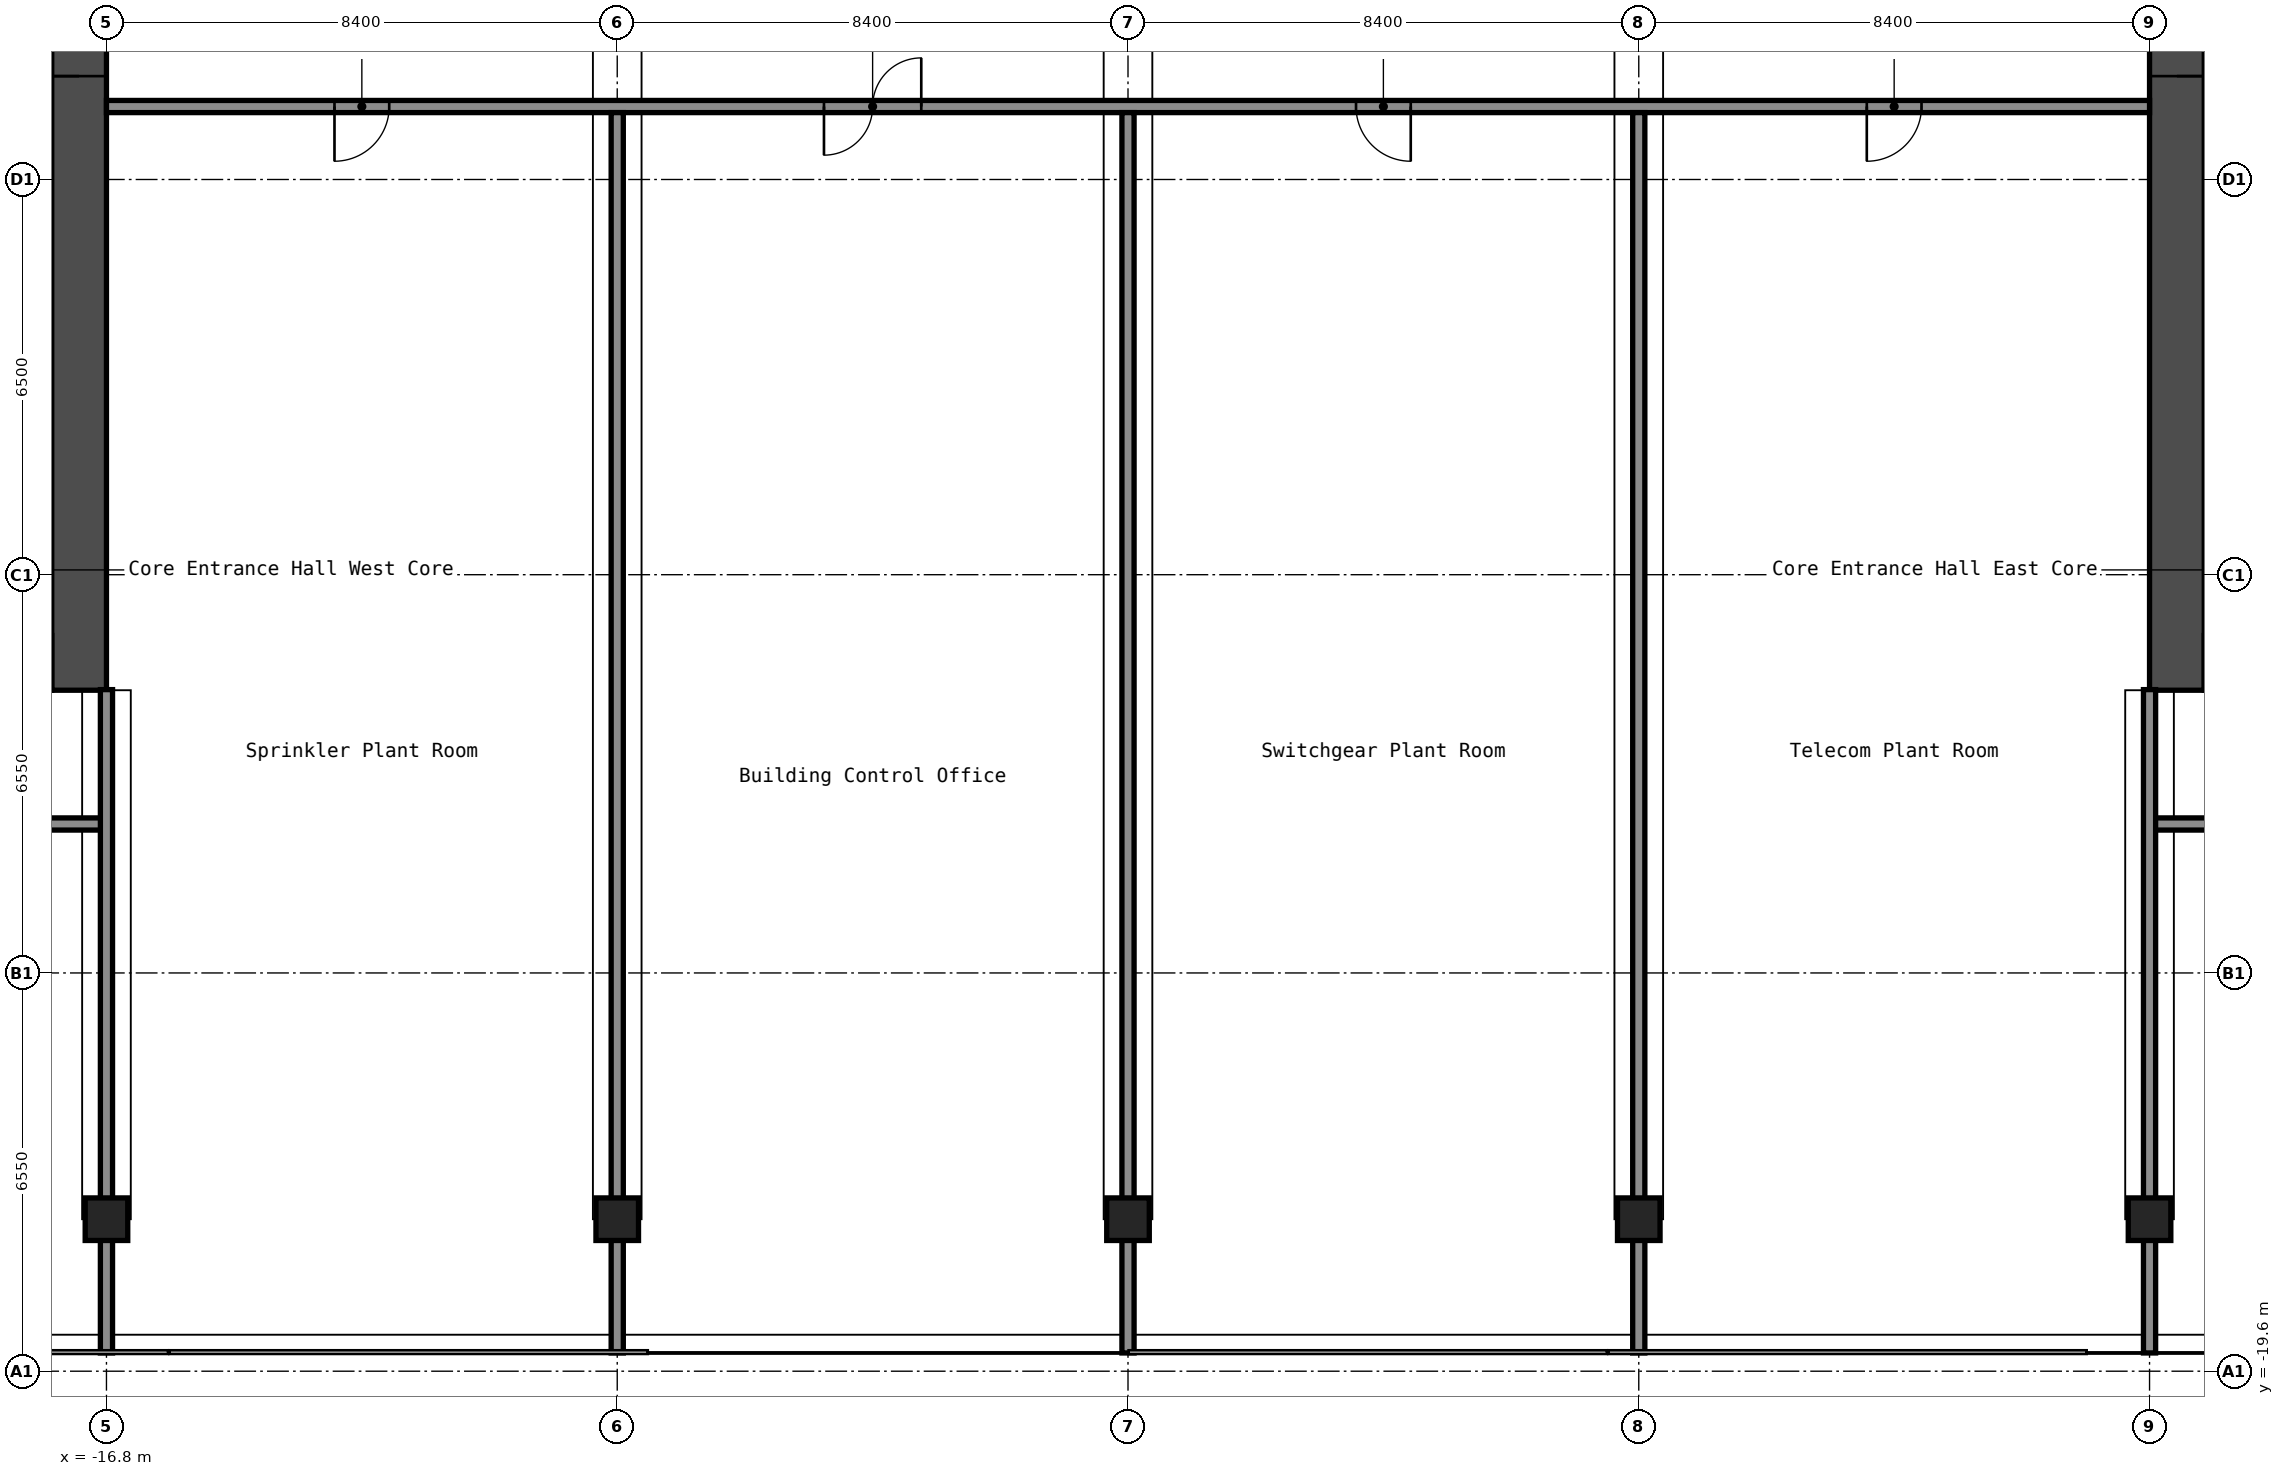
"""IFC4 building model, lengths in metres.
Left out: names, types, materials, properties, quantities, classifications, styles, units other than length and angle.
Written with IfcOpenShell. Run it as: python <this file> out.ifc"""

import sys

from ifc_helpers import new_model, si_unit, direction, frame, frame_2d, origin, origin_2d, place, context, subcontext, project, spatial, rectangle, hollow_rectangle, extrude, element, fill, save


model = new_model("IFC4")
c1 = context("Model", 3, precision=1e-05, world=origin(), true_north=direction((0.0, 1.0)))
c2 = subcontext(c1, "Body", "Model", "MODEL_VIEW")
j1 = project(units=[si_unit("LENGTHUNIT", "METRE"), si_unit("PLANEANGLEUNIT", "RADIAN")], contexts=[c1])
p1 = place(None, origin())
s1 = spatial("IfcSite", under=j1, at=p1, CompositionType="ELEMENT")
p2 = place(p1, origin())
s2 = spatial("IfcBuilding", under=s1, at=p2, CompositionType="ELEMENT")
p3 = place(p2, frame((0.0, 0.0, 175.8)))
s3 = spatial("IfcBuildingStorey", under=s2, at=p3, CompositionType="ELEMENT", Elevation=175.8)
for number, where, z_axis, x_axis in (
    (1, (-16.8, -17.1, 0.0), (0.0, 0.0, 1.0), (1.0, 0.0, 0.0)),
    (2, (-8.4, -17.1, 0.0), (0.0, 0.0, 1.0), (1.0, 0.0, 0.0)),
    (3, (0.0, -17.1, 0.0), (0.0, 0.0, 1.0), (1.0, 0.0, 0.0)),
    (4, (8.4, -17.1, 0.0), (0.0, 0.0, 1.0), (1.0, 0.0, 0.0)),
    (5, (16.8, -17.1, 0.0), (0.0, 0.0, 1.0), (1.0, 0.0, 0.0)),
):
    element("IfcColumn", number, at=place(p3, frame(where, z_axis=z_axis, x_axis=x_axis)), inside=s3, PredefinedType="COLUMN", context=c2, shape_type="SweptSolid", body=[
        extrude(hollow_rectangle(XDim=0.7, YDim=0.7, WallThickness=0.028, at=origin_2d()), origin(), (0.0, 0.0, 1.0), 4.1),
    ])
p4 = place(p3, frame((-17.25, -8.4, 0.0), z_axis=(0.0, 0.0, 1.0), x_axis=(0.0, 1.0, 0.0)))
e6 = element("IfcWall", 6, at=p4, inside=s3, PredefinedType="SHEAR", context=c2, shape_type="SweptSolid", body=[
    extrude(rectangle(XDim=16.8, YDim=0.9, at=frame_2d((8.4, 0.0))), origin(), (0.0, 0.0, 1.0), 4.1),
])
p5 = place(p4, frame((10.1, 0.0, 0.0)))
e7 = element("IfcOpeningElement", 7, at=p5, cuts=e6, PredefinedType="OPENING", context=c2, shape_type="SweptSolid", body=[
    extrude(rectangle(XDim=1.6, YDim=2.1, at=frame_2d((0.8, 1.05))), frame((0.0, 0.46, 0.0), z_axis=(0.0, -1.0, 0.0), x_axis=(1.0, 0.0, 0.0)), (0.0, 0.0, 1.0), 0.92),
])
p6 = place(p3, frame((-32.7, -7.95, 0.0), z_axis=(0.0, 0.0, 1.0), x_axis=(1.0, 0.0, 0.0)))
e8 = element("IfcWall", 8, at=p6, inside=s3, PredefinedType="SHEAR", context=c2, shape_type="SweptSolid", body=[
    extrude(rectangle(XDim=15.0, YDim=0.9, at=frame_2d((7.5, 0.0))), origin(), (0.0, 0.0, 1.0), 4.1),
])
p7 = place(p6, frame((11.45, 0.0, 0.0)))
e9 = element("IfcOpeningElement", 9, at=p7, cuts=e8, PredefinedType="OPENING", context=c2, shape_type="SweptSolid", body=[
    extrude(rectangle(XDim=1.0, YDim=2.1, at=frame_2d((0.5, 1.05))), frame((0.0, 0.46, 0.0), z_axis=(0.0, -1.0, 0.0), x_axis=(1.0, 0.0, 0.0)), (0.0, 0.0, 1.0), 0.92),
])
p8 = place(p3, frame((17.25, -8.4, 0.0), z_axis=(0.0, 0.0, 1.0), x_axis=(0.0, 1.0, 0.0)))
e10 = element("IfcWall", 10, at=p8, inside=s3, PredefinedType="SHEAR", context=c2, shape_type="SweptSolid", body=[
    extrude(rectangle(XDim=16.8, YDim=0.9, at=frame_2d((8.4, 0.0))), origin(), (0.0, 0.0, 1.0), 4.1),
])
p9 = place(p8, frame((10.1, 0.0, 0.0)))
e11 = element("IfcOpeningElement", 11, at=p9, cuts=e10, PredefinedType="OPENING", context=c2, shape_type="SweptSolid", body=[
    extrude(rectangle(XDim=1.6, YDim=2.1, at=frame_2d((0.8, 1.05))), frame((0.0, 0.46, 0.0), z_axis=(0.0, -1.0, 0.0), x_axis=(1.0, 0.0, 0.0)), (0.0, 0.0, 1.0), 0.92),
])
p10 = place(p3, frame((17.7, -7.95, 0.0), z_axis=(0.0, 0.0, 1.0), x_axis=(1.0, 0.0, 0.0)))
e12 = element("IfcWall", 12, at=p10, inside=s3, PredefinedType="SHEAR", context=c2, shape_type="SweptSolid", body=[
    extrude(rectangle(XDim=15.0, YDim=0.9, at=frame_2d((7.5, 0.0))), origin(), (0.0, 0.0, 1.0), 4.1),
])
p11 = place(p10, frame((2.55, 0.0, 0.0)))
e13 = element("IfcOpeningElement", 13, at=p11, cuts=e12, PredefinedType="OPENING", context=c2, shape_type="SweptSolid", body=[
    extrude(rectangle(XDim=1.0, YDim=2.1, at=frame_2d((0.5, 1.05))), frame((0.0, 0.46, 0.0), z_axis=(0.0, -1.0, 0.0), x_axis=(1.0, 0.0, 0.0)), (0.0, 0.0, 1.0), 0.92),
])
p12 = place(p3, frame((-42.7, -10.6, 0.0), z_axis=(0.0, 0.0, 1.0), x_axis=(1.0, 0.0, 0.0)))
e14 = element("IfcWall", 14, at=p12, inside=s3, PredefinedType="PARTITIONING", context=c2, shape_type="SweptSolid", body=[
    extrude(rectangle(XDim=25.9, YDim=0.2, at=frame_2d((12.95, 0.0))), origin(), (0.0, 0.0, 1.0), 4.1),
])
p13 = place(p12, frame((4.25, 0.0, 0.0)))
e15 = element("IfcOpeningElement", 15, at=p13, cuts=e14, PredefinedType="OPENING", context=c2, shape_type="SweptSolid", body=[
    extrude(rectangle(XDim=0.9, YDim=2.1, at=frame_2d((0.45, 1.05))), frame((0.0, 0.11, 0.0), z_axis=(0.0, -1.0, 0.0), x_axis=(1.0, 0.0, 0.0)), (0.0, 0.0, 1.0), 0.22),
])
p14 = place(p12, frame((12.5, 0.0, 0.0)))
e16 = element("IfcOpeningElement", 16, at=p14, cuts=e14, PredefinedType="OPENING", context=c2, shape_type="SweptSolid", body=[
    extrude(rectangle(XDim=1.6, YDim=2.1, at=frame_2d((0.8, 1.05))), frame((0.0, 0.11, 0.0), z_axis=(0.0, -1.0, 0.0), x_axis=(1.0, 0.0, 0.0)), (0.0, 0.0, 1.0), 0.22),
])
p15 = place(p12, frame((21.25, 0.0, 0.0)))
e17 = element("IfcOpeningElement", 17, at=p15, cuts=e14, PredefinedType="OPENING", context=c2, shape_type="SweptSolid", body=[
    extrude(rectangle(XDim=0.9, YDim=2.1, at=frame_2d((0.45, 1.05))), frame((0.0, 0.11, 0.0), z_axis=(0.0, -1.0, 0.0), x_axis=(1.0, 0.0, 0.0)), (0.0, 0.0, 1.0), 0.22),
])
p16 = place(p3, frame((16.8, -10.6, 0.0), z_axis=(0.0, 0.0, 1.0), x_axis=(1.0, 0.0, 0.0)))
e18 = element("IfcWall", 18, at=p16, inside=s3, PredefinedType="PARTITIONING", context=c2, shape_type="SweptSolid", body=[
    extrude(rectangle(XDim=25.9, YDim=0.2, at=frame_2d((12.95, 0.0))), origin(), (0.0, 0.0, 1.0), 4.1),
])
p17 = place(p16, frame((3.75, 0.0, 0.0)))
e19 = element("IfcOpeningElement", 19, at=p17, cuts=e18, PredefinedType="OPENING", context=c2, shape_type="SweptSolid", body=[
    extrude(rectangle(XDim=0.9, YDim=2.1, at=frame_2d((0.45, 1.05))), frame((0.0, 0.11, 0.0), z_axis=(0.0, -1.0, 0.0), x_axis=(1.0, 0.0, 0.0)), (0.0, 0.0, 1.0), 0.22),
])
p18 = place(p16, frame((11.8, 0.0, 0.0)))
e20 = element("IfcOpeningElement", 20, at=p18, cuts=e18, PredefinedType="OPENING", context=c2, shape_type="SweptSolid", body=[
    extrude(rectangle(XDim=1.6, YDim=2.1, at=frame_2d((0.8, 1.05))), frame((0.0, 0.11, 0.0), z_axis=(0.0, -1.0, 0.0), x_axis=(1.0, 0.0, 0.0)), (0.0, 0.0, 1.0), 0.22),
])
p19 = place(p16, frame((20.75, 0.0, 0.0)))
e21 = element("IfcOpeningElement", 21, at=p19, cuts=e18, PredefinedType="OPENING", context=c2, shape_type="SweptSolid", body=[
    extrude(rectangle(XDim=0.9, YDim=2.1, at=frame_2d((0.45, 1.05))), frame((0.0, 0.11, 0.0), z_axis=(0.0, -1.0, 0.0), x_axis=(1.0, 0.0, 0.0)), (0.0, 0.0, 1.0), 0.22),
])
p20 = place(p3, frame((-16.8, 1.2, 0.0), z_axis=(0.0, 0.0, 1.0), x_axis=(1.0, 0.0, 0.0)))
e22 = element("IfcWall", 22, at=p20, inside=s3, PredefinedType="PARTITIONING", context=c2, shape_type="SweptSolid", body=[
    extrude(rectangle(XDim=33.6, YDim=0.2, at=frame_2d((16.8, 0.0))), origin(), (0.0, 0.0, 1.0), 4.1),
])
p21 = place(p20, frame((3.75, 0.0, 0.0)))
e23 = element("IfcOpeningElement", 23, at=p21, cuts=e22, PredefinedType="OPENING", context=c2, shape_type="SweptSolid", body=[
    extrude(rectangle(XDim=0.9, YDim=2.1, at=frame_2d((0.45, 1.05))), frame((0.0, 0.11, 0.0), z_axis=(0.0, -1.0, 0.0), x_axis=(1.0, 0.0, 0.0)), (0.0, 0.0, 1.0), 0.22),
])
p22 = place(p20, frame((11.8, 0.0, 0.0)))
e24 = element("IfcOpeningElement", 24, at=p22, cuts=e22, PredefinedType="OPENING", context=c2, shape_type="SweptSolid", body=[
    extrude(rectangle(XDim=1.6, YDim=2.1, at=frame_2d((0.8, 1.05))), frame((0.0, 0.11, 0.0), z_axis=(0.0, -1.0, 0.0), x_axis=(1.0, 0.0, 0.0)), (0.0, 0.0, 1.0), 0.22),
])
p23 = place(p20, frame((20.55, 0.0, 0.0)))
e25 = element("IfcOpeningElement", 25, at=p23, cuts=e22, PredefinedType="OPENING", context=c2, shape_type="SweptSolid", body=[
    extrude(rectangle(XDim=0.9, YDim=2.1, at=frame_2d((0.45, 1.05))), frame((0.0, 0.11, 0.0), z_axis=(0.0, -1.0, 0.0), x_axis=(1.0, 0.0, 0.0)), (0.0, 0.0, 1.0), 0.22),
])
p24 = place(p20, frame((28.95, 0.0, 0.0)))
e26 = element("IfcOpeningElement", 26, at=p24, cuts=e22, PredefinedType="OPENING", context=c2, shape_type="SweptSolid", body=[
    extrude(rectangle(XDim=0.9, YDim=2.1, at=frame_2d((0.45, 1.05))), frame((0.0, 0.11, 0.0), z_axis=(0.0, -1.0, 0.0), x_axis=(1.0, 0.0, 0.0)), (0.0, 0.0, 1.0), 0.22),
])
p25 = place(p3, frame((-16.8, -19.3, 0.0), z_axis=(0.0, 0.0, 1.0), x_axis=(0.0, 1.0, 0.0)))
e27 = element("IfcWall", 27, at=p25, inside=s3, PredefinedType="PARTITIONING", context=c2, shape_type="SweptSolid", body=[
    extrude(rectangle(XDim=10.91, YDim=0.2, at=frame_2d((5.455, 0.0))), origin(), (0.0, 0.0, 1.0), 4.1),
])
for number, where, z_axis, x_axis in (
    (28, (-8.4, -19.3, 0.0), (0.0, 0.0, 1.0), (0.0, 1.0, 0.0)),
    (29, (0.0, -19.3, 0.0), (0.0, 0.0, 1.0), (0.0, 1.0, 0.0)),
    (30, (8.4, -19.3, 0.0), (0.0, 0.0, 1.0), (0.0, 1.0, 0.0)),
):
    element("IfcWall", number, at=place(p3, frame(where, z_axis=z_axis, x_axis=x_axis)), inside=s3, PredefinedType="PARTITIONING", context=c2, shape_type="SweptSolid", body=[
        extrude(rectangle(XDim=20.4, YDim=0.2, at=frame_2d((10.2, 0.0))), origin(), (0.0, 0.0, 1.0), 4.1),
    ])
p26 = place(p3, frame((16.8, -19.3, 0.0), z_axis=(0.0, 0.0, 1.0), x_axis=(0.0, 1.0, 0.0)))
e31 = element("IfcWall", 31, at=p26, inside=s3, PredefinedType="PARTITIONING", context=c2, shape_type="SweptSolid", body=[
    extrude(rectangle(XDim=10.91, YDim=0.2, at=frame_2d((5.455, 0.0))), origin(), (0.0, 0.0, 1.0), 4.1),
])
p27 = place(p5, origin())
e32 = element("IfcDoor", 32, at=p27, inside=s3, OperationType="DOUBLE_DOOR_SINGLE_SWING", PredefinedType="DOOR", context=c2, shape_type="SweptSolid", body=[
    extrude(rectangle(XDim=1.6, YDim=2.1, at=frame_2d((0.8, 1.05))), frame((0.0, 0.025, 0.0), z_axis=(0.0, -1.0, 0.0), x_axis=(1.0, 0.0, 0.0)), (0.0, 0.0, 1.0), 0.05),
])
fill(e7, e32)
p28 = place(p9, origin())
e33 = element("IfcDoor", 33, at=p28, inside=s3, OperationType="DOUBLE_DOOR_SINGLE_SWING", PredefinedType="DOOR", context=c2, shape_type="SweptSolid", body=[
    extrude(rectangle(XDim=1.6, YDim=2.1, at=frame_2d((0.8, 1.05))), frame((0.0, 0.025, 0.0), z_axis=(0.0, -1.0, 0.0), x_axis=(1.0, 0.0, 0.0)), (0.0, 0.0, 1.0), 0.05),
])
fill(e11, e33)
p29 = place(p21, origin())
e34 = element("IfcDoor", 34, at=p29, inside=s3, OperationType="SINGLE_SWING_LEFT", PredefinedType="DOOR", context=c2, shape_type="SweptSolid", body=[
    extrude(rectangle(XDim=0.9, YDim=2.1, at=frame_2d((0.45, 1.05))), frame((0.0, 0.025, 0.0), z_axis=(0.0, -1.0, 0.0), x_axis=(1.0, 0.0, 0.0)), (0.0, 0.0, 1.0), 0.05),
])
fill(e23, e34)
p30 = place(p22, origin())
e35 = element("IfcDoor", 35, at=p30, inside=s3, OperationType="DOUBLE_DOOR_SINGLE_SWING", PredefinedType="DOOR", context=c2, shape_type="SweptSolid", body=[
    extrude(rectangle(XDim=1.6, YDim=2.1, at=frame_2d((0.8, 1.05))), frame((0.0, 0.025, 0.0), z_axis=(0.0, -1.0, 0.0), x_axis=(1.0, 0.0, 0.0)), (0.0, 0.0, 1.0), 0.05),
])
fill(e24, e35)
p31 = place(p23, origin())
e36 = element("IfcDoor", 36, at=p31, inside=s3, OperationType="SINGLE_SWING_RIGHT", PredefinedType="DOOR", context=c2, shape_type="SweptSolid", body=[
    extrude(rectangle(XDim=0.9, YDim=2.1, at=frame_2d((0.45, 1.05))), frame((0.0, 0.025, 0.0), z_axis=(0.0, -1.0, 0.0), x_axis=(1.0, 0.0, 0.0)), (0.0, 0.0, 1.0), 0.05),
])
fill(e25, e36)
p32 = place(p24, origin())
e37 = element("IfcDoor", 37, at=p32, inside=s3, OperationType="SINGLE_SWING_LEFT", PredefinedType="DOOR", context=c2, shape_type="SweptSolid", body=[
    extrude(rectangle(XDim=0.9, YDim=2.1, at=frame_2d((0.45, 1.05))), frame((0.0, 0.025, 0.0), z_axis=(0.0, -1.0, 0.0), x_axis=(1.0, 0.0, 0.0)), (0.0, 0.0, 1.0), 0.05),
])
fill(e26, e37)
save(model, sys.argv[1])
